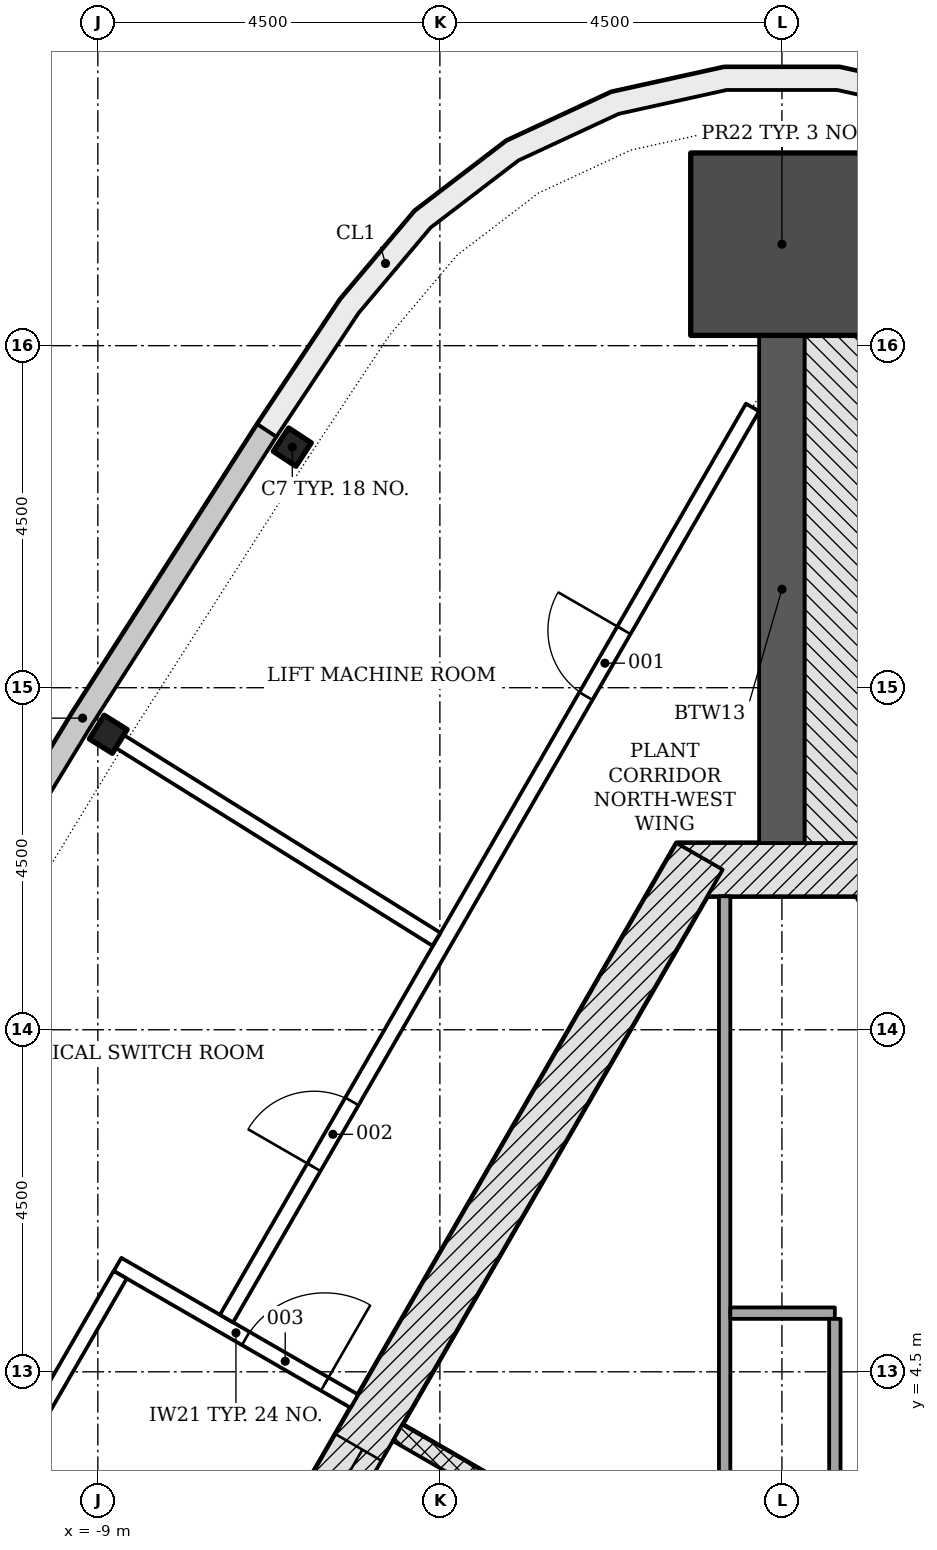
"""IFC4 building model, lengths in metres.
Left out: names, types, materials, properties, quantities, classifications, styles, units other than length and angle.
Written with IfcOpenShell. Run it as: python <this file> out.ifc"""

import sys

from ifc_helpers import new_model, si_unit, direction, frame, frame_2d, origin, origin_2d, place, context, subcontext, project, spatial, polyline, rectangle, i_section, outline, extrude, element, fill, save


model = new_model("IFC4")
c1 = context("Model", 3, precision=1e-05, world=origin(), true_north=direction((0.0, 1.0)))
c2 = subcontext(c1, "Body", "Model", "MODEL_VIEW")
j1 = project(units=[si_unit("LENGTHUNIT", "METRE"), si_unit("PLANEANGLEUNIT", "RADIAN")], contexts=[c1])
p1 = place(None, origin())
s1 = spatial("IfcSite", under=j1, at=p1, CompositionType="ELEMENT")
p2 = place(p1, origin())
s2 = spatial("IfcBuilding", under=s1, at=p2, CompositionType="ELEMENT")
p3 = place(p2, frame((0.0, 0.0, 302.1)))
s3 = spatial("IfcBuildingStorey", under=s2, at=p3, CompositionType="ELEMENT", Elevation=302.1)
p4 = place(p3, frame((10.311, -4.703, -0.25), z_axis=(0.0, 0.0, 1.0), x_axis=(-0.500001446645, 0.866024568562, 0.0)))
e1 = element("IfcWall", 1, at=p4, inside=s3, PredefinedType="SHEAR", context=c2, shape_type="SweptSolid", body=[
    extrude(rectangle(XDim=18.458, YDim=0.7, at=frame_2d((9.229, 0.0))), origin(), (0.0, 0.0, 1.0), 4.5),
])
p5 = place(p3, frame((1.386, 11.106, -0.25), z_axis=(0.0, 0.0, 1.0), x_axis=(-1.0, 0.0, 0.0)))
e2 = element("IfcWall", 2, at=p5, inside=s3, PredefinedType="SHEAR", context=c2, shape_type="SweptSolid", body=[
    extrude(rectangle(XDim=2.771, YDim=0.7, at=frame_2d((1.386, 0.0))), origin(), (0.0, 0.0, 1.0), 4.5),
])
p6 = place(p3, frame((-1.083, 11.281, -0.25), z_axis=(0.0, 0.0, 1.0), x_axis=(-0.500001446645, -0.866024568562, 0.0)))
e3 = element("IfcWall", 3, at=p6, inside=s3, PredefinedType="SHEAR", context=c2, shape_type="SweptSolid", body=[
    extrude(rectangle(XDim=18.458, YDim=0.7, at=frame_2d((9.229, 0.0))), origin(), (0.0, 0.0, 1.0), 4.5),
])
p7 = place(p6, frame((8.979, 0.0, 0.25)))
e4 = element("IfcOpeningElement", 4, at=p7, cuts=e3, PredefinedType="OPENING", context=c2, shape_type="SweptSolid", body=[
    extrude(rectangle(XDim=1.2, YDim=2.1, at=frame_2d((0.6, 1.05))), frame((0.0, 0.36, 0.0), z_axis=(0.0, -1.0, 0.0), x_axis=(1.0, 0.0, 0.0)), (0.0, 0.0, 1.0), 0.72),
])
p8 = place(p6, frame((11.029, 0.0, 0.25)))
e5 = element("IfcOpeningElement", 5, at=p8, cuts=e3, PredefinedType="OPENING", context=c2, shape_type="SweptSolid", body=[
    extrude(rectangle(XDim=1.2, YDim=2.1, at=frame_2d((0.6, 1.05))), frame((0.0, 0.36, 0.0), z_axis=(0.0, -1.0, 0.0), x_axis=(1.0, 0.0, 0.0)), (0.0, 0.0, 1.0), 0.72),
])
p9 = place(p3, frame((0.0, 11.456, -0.25), z_axis=(0.0, 0.0, 1.0), x_axis=(0.0, 1.0, 0.0)))
e6 = element("IfcWall", 6, at=p9, inside=s3, PredefinedType="SHEAR", context=c2, shape_type="SweptSolid", body=[
    extrude(rectangle(XDim=6.679, YDim=0.6, at=frame_2d((3.339, 0.0))), origin(), (0.0, 0.0, 1.0), 4.5),
])
p10 = place(p3, frame((0.0, 19.335, -0.25), z_axis=(0.0, 0.0, 1.0), x_axis=(0.0, 1.0, 0.0)))
e7 = element("IfcColumn", 7, at=p10, inside=s3, PredefinedType="COLUMN", context=c2, shape_type="SweptSolid", body=[
    extrude(rectangle(XDim=2.4, YDim=2.4, at=origin_2d()), origin(), (0.0, 0.0, 1.0), 4.5),
])
for number, where, z_axis, x_axis in (
    (8, (-6.442, 16.666, -0.25), (0.0, 0.0, 1.0), (-0.549, -0.836, 0.0)),
    (9, (-8.863, 12.888, -0.25), (0.0, 0.0, 1.0), (-0.53, -0.848, 0.0)),
):
    element("IfcColumn", number, at=place(p3, frame(where, z_axis=z_axis, x_axis=x_axis)), inside=s3, PredefinedType="COLUMN", context=c2, shape_type="SweptSolid", body=[
        extrude(i_section(OverallWidth=0.368, OverallDepth=0.356, WebThickness=0.011, FlangeThickness=0.018, FilletRadius=0.015, at=origin_2d()), origin(), (0.0, 0.0, 1.0), 4.5),
    ])
p11 = place(p3, origin())
e10 = element("IfcWall", 10, at=p11, inside=s3, PredefinedType="NOTDEFINED", context=c2, shape_type="SweptSolid", body=[
    extrude(outline(polyline([(-6.901, 16.968), (-9.33, 13.179), (-11.669, 9.335), (-11.413, 9.179), (-9.075, 13.02), (-6.649, 16.806), (-6.901, 16.968)])), origin(), (0.0, 0.0, 1.0), 4.25),
])
p12 = place(p3, origin())
e11 = element("IfcWall", 11, at=p12, inside=s3, PredefinedType="NOTDEFINED", context=c2, shape_type="SweptSolid", body=[
    extrude(outline(polyline([(6.901, 16.968), (5.81, 18.61), (4.83, 19.771), (3.623, 20.695), (2.244, 21.335), (0.76, 21.664), (-0.76, 21.664), (-2.244, 21.335), (-3.623, 20.695), (-4.83, 19.771), (-5.81, 18.61), (-6.901, 16.968), (-6.651, 16.802), (-5.569, 18.429), (-4.622, 19.553), (-3.466, 20.437), (-2.147, 21.05), (-0.727, 21.364), (0.727, 21.364), (2.147, 21.05), (3.466, 20.437), (4.622, 19.553), (5.569, 18.429), (6.651, 16.802), (6.901, 16.968)])), origin(), (0.0, 0.0, 1.0), 4.25),
])
p13 = place(p3, frame((-5.056, 3.699, -0.25), z_axis=(0.0, 0.0, 1.0), x_axis=(0.866032775405, -0.499987231761, 0.0)))
e12 = element("IfcWall", 12, at=p13, inside=s3, PredefinedType="PARTITIONING", context=c2, shape_type="SweptSolid", body=[
    extrude(rectangle(XDim=2.9, YDim=0.25, at=frame_2d((1.45, 0.0))), origin(), (0.0, 0.0, 1.0), 4.5),
])
p14 = place(p3, frame((-0.754, 10.756, 0.0), z_axis=(0.0, 0.0, 1.0), x_axis=(0.0, -1.0, 0.0)))
e13 = element("IfcWall", 13, at=p14, inside=s3, PredefinedType="PARTITIONING", context=c2, shape_type="SweptSolid", body=[
    extrude(rectangle(XDim=16.985, YDim=0.15, at=frame_2d((8.492, 0.0))), origin(), (0.0, 0.0, 1.0), 4.25),
])
p15 = place(p14, frame((9.185, 0.0, 0.0)))
e14 = element("IfcOpeningElement", 14, at=p15, cuts=e13, PredefinedType="OPENING", context=c2, shape_type="SweptSolid", body=[
    extrude(rectangle(XDim=0.9, YDim=2.1, at=frame_2d((0.45, 1.05))), frame((0.0, 0.085, 0.0), z_axis=(0.0, -1.0, 0.0), x_axis=(1.0, 0.0, 0.0)), (0.0, 0.0, 1.0), 0.17),
])
p16 = place(p3, frame((-0.679, 5.272, 0.0), z_axis=(0.0, 0.0, 1.0), x_axis=(1.0, 0.0, 0.0)))
e15 = element("IfcWall", 15, at=p16, inside=s3, PredefinedType="PARTITIONING", context=c2, shape_type="SweptSolid", body=[
    extrude(rectangle(XDim=1.375, YDim=0.15, at=frame_2d((0.688, 0.0))), origin(), (0.0, 0.0, 1.0), 4.25),
])
p17 = place(p3, frame((0.696, 5.197, 0.0), z_axis=(0.0, 0.0, 1.0), x_axis=(0.0, -1.0, 0.0)))
e16 = element("IfcWall", 16, at=p17, inside=s3, PredefinedType="PARTITIONING", context=c2, shape_type="SweptSolid", body=[
    extrude(rectangle(XDim=11.425, YDim=0.15, at=frame_2d((5.712, 0.0))), origin(), (0.0, 0.0, 1.0), 4.25),
])
p18 = place(p17, frame((3.664, 0.0, 0.0)))
e17 = element("IfcOpeningElement", 17, at=p18, cuts=e16, PredefinedType="OPENING", context=c2, shape_type="SweptSolid", body=[
    extrude(rectangle(XDim=0.9, YDim=2.1, at=frame_2d((0.45, 1.05))), frame((0.0, 0.085, 0.0), z_axis=(0.0, -1.0, 0.0), x_axis=(1.0, 0.0, 0.0)), (0.0, 0.0, 1.0), 0.17),
])
p19 = place(p3, frame((0.943, 11.456, -0.25), z_axis=(0.0, 0.0, 1.0), x_axis=(0.0, 1.0, 0.0)))
e18 = element("IfcWall", 18, at=p19, inside=s3, PredefinedType="SHEAR", context=c2, shape_type="SweptSolid", body=[
    extrude(rectangle(XDim=6.679, YDim=1.286, at=frame_2d((3.339, 0.0))), origin(), (0.0, 0.0, 1.0), 4.5),
])
p20 = place(p3, frame((-8.741, 5.913, 0.0), z_axis=(0.0, 0.0, 1.0), x_axis=(0.866017220491, -0.500014173611, 0.0)))
e19 = element("IfcWall", 19, at=p20, inside=s3, PredefinedType="PARTITIONING", context=c2, shape_type="SweptSolid", body=[
    extrude(rectangle(XDim=3.598, YDim=0.2, at=frame_2d((1.799, 0.0))), origin(), (0.0, 0.0, 1.0), 4.25),
])
p21 = place(p20, frame((1.948, 0.0, 0.0)))
e20 = element("IfcOpeningElement", 20, at=p21, cuts=e19, PredefinedType="OPENING", context=c2, shape_type="SweptSolid", body=[
    extrude(rectangle(XDim=1.2, YDim=2.1, at=frame_2d((0.6, 1.05))), frame((0.0, 0.11, 0.0), z_axis=(0.0, -1.0, 0.0), x_axis=(1.0, 0.0, 0.0)), (0.0, 0.0, 1.0), 0.22),
])
p22 = place(p3, frame((-12.658, -1.068, 0.0), z_axis=(0.0, 0.0, 1.0), x_axis=(0.499996073327, 0.866027670838, 0.0)))
e21 = element("IfcWall", 21, at=p22, inside=s3, PredefinedType="PARTITIONING", context=c2, shape_type="SweptSolid", body=[
    extrude(rectangle(XDim=7.904, YDim=0.2, at=frame_2d((3.952, 0.0))), origin(), (0.0, 0.0, 1.0), 3.702),
])
p23 = place(p22, frame((0.541, 0.0, 0.0)))
e22 = element("IfcOpeningElement", 22, at=p23, cuts=e21, PredefinedType="OPENING", context=c2, shape_type="SweptSolid", body=[
    extrude(rectangle(XDim=1.2, YDim=2.1, at=frame_2d((0.6, 1.05))), frame((0.0, 0.11, 0.0), z_axis=(0.0, -1.0, 0.0), x_axis=(1.0, 0.0, 0.0)), (0.0, 0.0, 1.0), 0.22),
])
p24 = place(p3, frame((-7.307, 5.2, 0.0), z_axis=(0.0, 0.0, 1.0), x_axis=(0.49999780173, 0.866026672953, 0.0)))
e23 = element("IfcWall", 23, at=p24, inside=s3, PredefinedType="PARTITIONING", context=c2, shape_type="SweptSolid", body=[
    extrude(rectangle(XDim=13.841, YDim=0.2, at=frame_2d((6.92, 0.0))), origin(), (0.0, 0.0, 1.0), 3.702),
])
p25 = place(p24, frame((9.457, 0.0, 0.0)))
e24 = element("IfcOpeningElement", 24, at=p25, cuts=e23, PredefinedType="OPENING", context=c2, shape_type="SweptSolid", body=[
    extrude(rectangle(XDim=1.0, YDim=2.1, at=frame_2d((0.5, 1.05))), frame((0.0, 0.11, 0.0), z_axis=(0.0, -1.0, 0.0), x_axis=(1.0, 0.0, 0.0)), (0.0, 0.0, 1.0), 0.22),
])
p26 = place(p24, frame((2.299, 0.0, 0.0)))
e25 = element("IfcOpeningElement", 25, at=p26, cuts=e23, PredefinedType="OPENING", context=c2, shape_type="SweptSolid", body=[
    extrude(rectangle(XDim=1.0, YDim=2.1, at=frame_2d((0.5, 1.05))), frame((0.0, 0.11, 0.0), z_axis=(0.0, -1.0, 0.0), x_axis=(1.0, 0.0, 0.0)), (0.0, 0.0, 1.0), 0.22),
])
p27 = place(p3, frame((-8.736, 12.808, 0.0), z_axis=(0.0, 0.0, 1.0), x_axis=(0.848106554737, -0.529825699463, 0.0)))
e26 = element("IfcWall", 26, at=p27, inside=s3, PredefinedType="PARTITIONING", context=c2, shape_type="SweptSolid", body=[
    extrude(rectangle(XDim=4.941, YDim=0.2, at=frame_2d((2.47, 0.0))), origin(), (0.0, 0.0, 1.0), 3.702),
])
p28 = place(p7, origin())
e27 = element("IfcDoor", 27, at=p28, inside=s3, OperationType="DOUBLE_DOOR_SLIDING", PredefinedType="DOOR", context=c2, shape_type="SweptSolid", body=[
    extrude(rectangle(XDim=1.2, YDim=2.1, at=frame_2d((0.6, 1.05))), frame((0.0, 0.025, 0.0), z_axis=(0.0, -1.0, 0.0), x_axis=(1.0, 0.0, 0.0)), (0.0, 0.0, 1.0), 0.05),
])
fill(e4, e27)
p29 = place(p25, origin())
e28 = element("IfcDoor", 28, at=p29, inside=s3, OperationType="SINGLE_SWING_RIGHT", PredefinedType="DOOR", context=c2, shape_type="SweptSolid", body=[
    extrude(rectangle(XDim=1.0, YDim=2.1, at=frame_2d((0.5, 1.05))), frame((0.0, 0.025, 0.0), z_axis=(0.0, -1.0, 0.0), x_axis=(1.0, 0.0, 0.0)), (0.0, 0.0, 1.0), 0.05),
])
fill(e24, e28)
p30 = place(p26, origin())
e29 = element("IfcDoor", 29, at=p30, inside=s3, OperationType="SINGLE_SWING_LEFT", PredefinedType="DOOR", context=c2, shape_type="SweptSolid", body=[
    extrude(rectangle(XDim=1.0, YDim=2.1, at=frame_2d((0.5, 1.05))), frame((0.0, 0.025, 0.0), z_axis=(0.0, -1.0, 0.0), x_axis=(1.0, 0.0, 0.0)), (0.0, 0.0, 1.0), 0.05),
])
fill(e25, e29)
p31 = place(p21, origin())
e30 = element("IfcDoor", 30, at=p31, inside=s3, OperationType="SINGLE_SWING_RIGHT", PredefinedType="DOOR", context=c2, shape_type="SweptSolid", body=[
    extrude(rectangle(XDim=1.2, YDim=2.1, at=frame_2d((0.6, 1.05))), frame((0.0, 0.025, 0.0), z_axis=(0.0, -1.0, 0.0), x_axis=(1.0, 0.0, 0.0)), (0.0, 0.0, 1.0), 0.05),
])
fill(e20, e30)
save(model, sys.argv[1])
